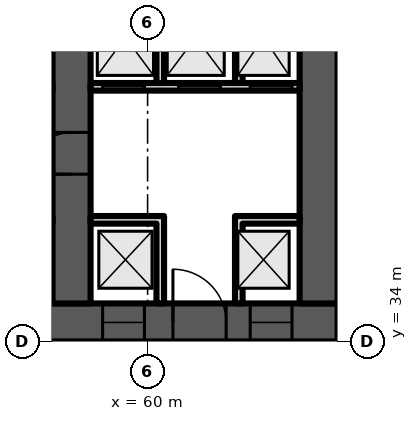
"""IFC4 building model, lengths in metres.
Left out: names, types, materials, properties, quantities, classifications, styles, units other than length and angle.
Written with IfcOpenShell. Run it as: python <this file> out.ifc"""

import sys

from ifc_helpers import new_model, si_unit, direction, frame, frame_2d, origin, place, context, subcontext, project, spatial, polyline, rectangle, outline, extrude, element, fill, save


model = new_model("IFC4")
c1 = context("Model", 3, precision=1e-05, world=origin(), true_north=direction((0.0, 1.0)))
c2 = subcontext(c1, "Body", "Model", "MODEL_VIEW")
j1 = project(units=[si_unit("LENGTHUNIT", "METRE"), si_unit("PLANEANGLEUNIT", "RADIAN")], contexts=[c1])
p1 = place(None, origin())
s1 = spatial("IfcSite", under=j1, at=p1, CompositionType="ELEMENT")
p2 = place(p1, origin())
s2 = spatial("IfcBuilding", under=s1, at=p2, CompositionType="ELEMENT")
p3 = place(p2, frame((0.0, 0.0, 121.9)))
s3 = spatial("IfcBuildingStorey", under=s2, at=p3, CompositionType="ELEMENT", Elevation=121.9)
p4 = place(p3, frame((16.0, 34.5, 0.0), z_axis=(0.0, 0.0, 1.0), x_axis=(1.0, 0.0, 0.0)))
e1 = element("IfcWall", 1, at=p4, inside=s3, PredefinedType="SHEAR", context=c2, shape_type="SweptSolid", body=[
    extrude(rectangle(XDim=49.0, YDim=1.0, at=frame_2d((24.5, 0.0))), origin(), (0.0, 0.0, 1.0), 3.6),
])
p5 = place(p4, frame((1.2, 0.0, 0.0)))
e2 = element("IfcOpeningElement", 2, at=p5, cuts=e1, PredefinedType="OPENING", context=c2, shape_type="SweptSolid", body=[
    extrude(rectangle(XDim=1.1, YDim=2.1, at=frame_2d((0.55, 1.05))), frame((0.0, 0.51, 0.0), z_axis=(0.0, -1.0, 0.0), x_axis=(1.0, 0.0, 0.0)), (0.0, 0.0, 1.0), 1.02),
])
p6 = place(p4, frame((5.083, 0.0, 0.0)))
e3 = element("IfcOpeningElement", 3, at=p6, cuts=e1, PredefinedType="OPENING", context=c2, shape_type="SweptSolid", body=[
    extrude(rectangle(XDim=1.1, YDim=2.1, at=frame_2d((0.55, 1.05))), frame((0.0, 0.51, 0.0), z_axis=(0.0, -1.0, 0.0), x_axis=(1.0, 0.0, 0.0)), (0.0, 0.0, 1.0), 1.02),
])
p7 = place(p4, frame((2.933, 0.0, 0.0)))
e4 = element("IfcOpeningElement", 4, at=p7, cuts=e1, PredefinedType="OPENING", context=c2, shape_type="SweptSolid", body=[
    extrude(rectangle(XDim=1.4, YDim=2.1, at=frame_2d((0.7, 1.05))), frame((0.0, 0.51, 0.0), z_axis=(0.0, -1.0, 0.0), x_axis=(1.0, 0.0, 0.0)), (0.0, 0.0, 1.0), 1.02),
])
p8 = place(p4, frame((7.65, 0.0, 0.0)))
e5 = element("IfcOpeningElement", 5, at=p8, cuts=e1, PredefinedType="OPENING", context=c2, shape_type="SweptSolid", body=[
    extrude(rectangle(XDim=1.2, YDim=2.1, at=frame_2d((0.6, 1.05))), frame((0.0, 0.51, 0.0), z_axis=(0.0, -1.0, 0.0), x_axis=(1.0, 0.0, 0.0)), (0.0, 0.0, 1.0), 1.02),
])
p9 = place(p4, frame((14.817, 0.0, 0.0)))
e6 = element("IfcOpeningElement", 6, at=p9, cuts=e1, PredefinedType="OPENING", context=c2, shape_type="SweptSolid", body=[
    extrude(rectangle(XDim=1.1, YDim=2.1, at=frame_2d((0.55, 1.05))), frame((0.0, 0.51, 0.0), z_axis=(0.0, -1.0, 0.0), x_axis=(1.0, 0.0, 0.0)), (0.0, 0.0, 1.0), 1.02),
])
p10 = place(p4, frame((19.083, 0.0, 0.0)))
e7 = element("IfcOpeningElement", 7, at=p10, cuts=e1, PredefinedType="OPENING", context=c2, shape_type="SweptSolid", body=[
    extrude(rectangle(XDim=1.1, YDim=2.1, at=frame_2d((0.55, 1.05))), frame((0.0, 0.51, 0.0), z_axis=(0.0, -1.0, 0.0), x_axis=(1.0, 0.0, 0.0)), (0.0, 0.0, 1.0), 1.02),
])
p11 = place(p4, frame((16.8, 0.0, 0.0)))
e8 = element("IfcOpeningElement", 8, at=p11, cuts=e1, PredefinedType="OPENING", context=c2, shape_type="SweptSolid", body=[
    extrude(rectangle(XDim=1.4, YDim=2.1, at=frame_2d((0.7, 1.05))), frame((0.0, 0.51, 0.0), z_axis=(0.0, -1.0, 0.0), x_axis=(1.0, 0.0, 0.0)), (0.0, 0.0, 1.0), 1.02),
])
p12 = place(p4, frame((21.817, 0.0, 0.0)))
e9 = element("IfcOpeningElement", 9, at=p12, cuts=e1, PredefinedType="OPENING", context=c2, shape_type="SweptSolid", body=[
    extrude(rectangle(XDim=1.1, YDim=2.1, at=frame_2d((0.55, 1.05))), frame((0.0, 0.51, 0.0), z_axis=(0.0, -1.0, 0.0), x_axis=(1.0, 0.0, 0.0)), (0.0, 0.0, 1.0), 1.02),
])
p13 = place(p4, frame((26.083, 0.0, 0.0)))
e10 = element("IfcOpeningElement", 10, at=p13, cuts=e1, PredefinedType="OPENING", context=c2, shape_type="SweptSolid", body=[
    extrude(rectangle(XDim=1.1, YDim=2.1, at=frame_2d((0.55, 1.05))), frame((0.0, 0.51, 0.0), z_axis=(0.0, -1.0, 0.0), x_axis=(1.0, 0.0, 0.0)), (0.0, 0.0, 1.0), 1.02),
])
p14 = place(p4, frame((33.15, 0.0, 0.0)))
e11 = element("IfcOpeningElement", 11, at=p14, cuts=e1, PredefinedType="OPENING", context=c2, shape_type="SweptSolid", body=[
    extrude(rectangle(XDim=1.2, YDim=2.1, at=frame_2d((0.6, 1.05))), frame((0.0, 0.51, 0.0), z_axis=(0.0, -1.0, 0.0), x_axis=(1.0, 0.0, 0.0)), (0.0, 0.0, 1.0), 1.02),
])
p15 = place(p4, frame((37.8, 0.0, 0.0)))
e12 = element("IfcOpeningElement", 12, at=p15, cuts=e1, PredefinedType="OPENING", context=c2, shape_type="SweptSolid", body=[
    extrude(rectangle(XDim=1.4, YDim=2.1, at=frame_2d((0.7, 1.05))), frame((0.0, 0.51, 0.0), z_axis=(0.0, -1.0, 0.0), x_axis=(1.0, 0.0, 0.0)), (0.0, 0.0, 1.0), 1.02),
])
p16 = place(p4, frame((42.817, 0.0, 0.0)))
e13 = element("IfcOpeningElement", 13, at=p16, cuts=e1, PredefinedType="OPENING", context=c2, shape_type="SweptSolid", body=[
    extrude(rectangle(XDim=1.1, YDim=2.1, at=frame_2d((0.55, 1.05))), frame((0.0, 0.51, 0.0), z_axis=(0.0, -1.0, 0.0), x_axis=(1.0, 0.0, 0.0)), (0.0, 0.0, 1.0), 1.02),
])
p17 = place(p4, frame((46.7, 0.0, 0.0)))
e14 = element("IfcOpeningElement", 14, at=p17, cuts=e1, PredefinedType="OPENING", context=c2, shape_type="SweptSolid", body=[
    extrude(rectangle(XDim=1.1, YDim=2.1, at=frame_2d((0.55, 1.05))), frame((0.0, 0.51, 0.0), z_axis=(0.0, -1.0, 0.0), x_axis=(1.0, 0.0, 0.0)), (0.0, 0.0, 1.0), 1.02),
])
p18 = place(p4, frame((44.667, 0.0, 0.0)))
e15 = element("IfcOpeningElement", 15, at=p18, cuts=e1, PredefinedType="OPENING", context=c2, shape_type="SweptSolid", body=[
    extrude(rectangle(XDim=1.4, YDim=2.1, at=frame_2d((0.7, 1.05))), frame((0.0, 0.51, 0.0), z_axis=(0.0, -1.0, 0.0), x_axis=(1.0, 0.0, 0.0)), (0.0, 0.0, 1.0), 1.02),
])
p19 = place(p3, frame((58.0, 35.0, 0.0), z_axis=(0.0, 0.0, 1.0), x_axis=(0.0, 1.0, 0.0)))
e16 = element("IfcWall", 16, at=p19, inside=s3, PredefinedType="SHEAR", context=c2, shape_type="SweptSolid", body=[
    extrude(rectangle(XDim=13.352, YDim=1.0, at=frame_2d((6.676, 0.0))), origin(), (0.0, 0.0, 1.0), 3.6),
])
p20 = place(p19, frame((10.426, 0.0, 0.0)))
e17 = element("IfcOpeningElement", 17, at=p20, cuts=e16, PredefinedType="OPENING", context=c2, shape_type="SweptSolid", body=[
    extrude(rectangle(XDim=1.0, YDim=2.1, at=frame_2d((0.5, 1.05))), frame((0.0, 0.51, 0.0), z_axis=(0.0, -1.0, 0.0), x_axis=(1.0, 0.0, 0.0)), (0.0, 0.0, 1.0), 1.02),
])
p21 = place(p19, frame((3.4, 0.0, 0.0)))
e18 = element("IfcOpeningElement", 18, at=p21, cuts=e16, PredefinedType="OPENING", context=c2, shape_type="SweptSolid", body=[
    extrude(rectangle(XDim=1.1, YDim=2.1, at=frame_2d((0.55, 1.05))), frame((0.0, 0.51, 0.0), z_axis=(0.0, -1.0, 0.0), x_axis=(1.0, 0.0, 0.0)), (0.0, 0.0, 1.0), 1.02),
])
p22 = place(p3, frame((64.5, 35.0, 0.0), z_axis=(0.0, 0.0, 1.0), x_axis=(0.0, 1.0, 0.0)))
e19 = element("IfcWall", 19, at=p22, inside=s3, PredefinedType="SHEAR", context=c2, shape_type="SweptSolid", body=[
    extrude(rectangle(XDim=12.784, YDim=1.0, at=frame_2d((6.392, 0.0))), origin(), (0.0, 0.0, 1.0), 3.6),
])
p23 = place(p3, frame((58.5, 40.7, 0.0), z_axis=(0.0, 0.0, 1.0), x_axis=(1.0, 0.0, 0.0)))
e20 = element("IfcWall", 20, at=p23, inside=s3, PredefinedType="PARTITIONING", context=c2, shape_type="SweptSolid", body=[
    extrude(rectangle(XDim=5.5, YDim=0.2, at=frame_2d((2.75, 0.0))), origin(), (0.0, 0.0, 1.0), 3.2),
])
p24 = place(p23, frame((0.317, 0.0, 0.0)))
e21 = element("IfcOpeningElement", 21, at=p24, cuts=e20, PredefinedType="OPENING", context=c2, shape_type="SweptSolid", body=[
    extrude(rectangle(XDim=1.1, YDim=2.1, at=frame_2d((0.55, 1.05))), frame((0.0, 0.11, 0.0), z_axis=(0.0, -1.0, 0.0), x_axis=(1.0, 0.0, 0.0)), (0.0, 0.0, 1.0), 0.22),
])
p25 = place(p23, frame((2.317, 0.0, 0.0)))
e22 = element("IfcOpeningElement", 22, at=p25, cuts=e20, PredefinedType="OPENING", context=c2, shape_type="SweptSolid", body=[
    extrude(rectangle(XDim=1.1, YDim=2.1, at=frame_2d((0.55, 1.05))), frame((0.0, 0.11, 0.0), z_axis=(0.0, -1.0, 0.0), x_axis=(1.0, 0.0, 0.0)), (0.0, 0.0, 1.0), 0.22),
])
p26 = place(p23, frame((4.2, 0.0, 0.0)))
e23 = element("IfcOpeningElement", 23, at=p26, cuts=e20, PredefinedType="OPENING", context=c2, shape_type="SweptSolid", body=[
    extrude(rectangle(XDim=1.1, YDim=2.1, at=frame_2d((0.55, 1.05))), frame((0.0, 0.11, 0.0), z_axis=(0.0, -1.0, 0.0), x_axis=(1.0, 0.0, 0.0)), (0.0, 0.0, 1.0), 0.22),
])
p27 = place(p3, origin())
e24 = element("IfcWall", 24, at=p27, inside=s3, PredefinedType="PARTITIONING", context=c2, shape_type="SweptSolid", body=[
    extrude(outline(polyline([(60.233, 37.1), (58.5, 37.1), (58.5, 37.3), (60.233, 37.3), (60.433, 37.3), (60.433, 35.0), (60.233, 35.0), (60.233, 37.1)])), origin(), (0.0, 0.0, 1.0), 3.2),
])
p28 = place(p3, origin())
e25 = element("IfcWall", 25, at=p28, inside=s3, PredefinedType="PARTITIONING", context=c2, shape_type="SweptSolid", body=[
    extrude(outline(polyline([(62.3, 37.3), (62.5, 37.3), (64.0, 37.3), (64.0, 37.1), (62.5, 37.1), (62.5, 35.0), (62.3, 35.0), (62.3, 37.3)])), origin(), (0.0, 0.0, 1.0), 3.2),
])
p29 = place(p3, origin())
e26 = element("IfcWall", 26, at=p29, inside=s3, PredefinedType="PARTITIONING", context=c2, shape_type="SweptSolid", body=[
    extrude(outline(polyline([(60.433, 40.8), (60.233, 40.8), (60.233, 43.8), (58.5, 43.8), (58.5, 44.0), (64.0, 44.0), (64.0, 43.8), (62.5, 43.8), (62.5, 40.8), (62.3, 40.8), (62.3, 43.8), (60.433, 43.8), (60.433, 40.8)])), origin(), (0.0, 0.0, 1.0), 3.2),
])
p30 = place(p16, origin())
e27 = element("IfcDoor", 27, at=p30, inside=s3, OperationType="DOUBLE_DOOR_SLIDING", PredefinedType="DOOR", context=c2, shape_type="SweptSolid", body=[
    extrude(rectangle(XDim=1.1, YDim=2.1, at=frame_2d((0.55, 1.05))), frame((0.0, 0.025, 0.0), z_axis=(0.0, -1.0, 0.0), x_axis=(1.0, 0.0, 0.0)), (0.0, 0.0, 1.0), 0.05),
])
fill(e13, e27)
p31 = place(p17, origin())
e28 = element("IfcDoor", 28, at=p31, inside=s3, OperationType="DOUBLE_DOOR_SLIDING", PredefinedType="DOOR", context=c2, shape_type="SweptSolid", body=[
    extrude(rectangle(XDim=1.1, YDim=2.1, at=frame_2d((0.55, 1.05))), frame((0.0, 0.025, 0.0), z_axis=(0.0, -1.0, 0.0), x_axis=(1.0, 0.0, 0.0)), (0.0, 0.0, 1.0), 0.05),
])
fill(e14, e28)
p32 = place(p18, origin())
e29 = element("IfcDoor", 29, at=p32, inside=s3, OperationType="DOUBLE_DOOR_SINGLE_SWING", PredefinedType="DOOR", context=c2, shape_type="SweptSolid", body=[
    extrude(rectangle(XDim=1.4, YDim=2.1, at=frame_2d((0.7, 1.05))), frame((0.0, 0.025, 0.0), z_axis=(0.0, -1.0, 0.0), x_axis=(1.0, 0.0, 0.0)), (0.0, 0.0, 1.0), 0.05),
])
fill(e15, e29)
p33 = place(p24, origin())
e30 = element("IfcDoor", 30, at=p33, inside=s3, OperationType="DOUBLE_DOOR_SLIDING", PredefinedType="DOOR", context=c2, shape_type="SweptSolid", body=[
    extrude(rectangle(XDim=1.1, YDim=2.1, at=frame_2d((0.55, 1.05))), frame((0.0, 0.025, 0.0), z_axis=(0.0, -1.0, 0.0), x_axis=(1.0, 0.0, 0.0)), (0.0, 0.0, 1.0), 0.05),
])
fill(e21, e30)
p34 = place(p25, origin())
e31 = element("IfcDoor", 31, at=p34, inside=s3, OperationType="DOUBLE_DOOR_SLIDING", PredefinedType="DOOR", context=c2, shape_type="SweptSolid", body=[
    extrude(rectangle(XDim=1.1, YDim=2.1, at=frame_2d((0.55, 1.05))), frame((0.0, 0.025, 0.0), z_axis=(0.0, -1.0, 0.0), x_axis=(1.0, 0.0, 0.0)), (0.0, 0.0, 1.0), 0.05),
])
fill(e22, e31)
p35 = place(p26, origin())
e32 = element("IfcDoor", 32, at=p35, inside=s3, OperationType="DOUBLE_DOOR_SLIDING", PredefinedType="DOOR", context=c2, shape_type="SweptSolid", body=[
    extrude(rectangle(XDim=1.1, YDim=2.1, at=frame_2d((0.55, 1.05))), frame((0.0, 0.025, 0.0), z_axis=(0.0, -1.0, 0.0), x_axis=(1.0, 0.0, 0.0)), (0.0, 0.0, 1.0), 0.05),
])
fill(e23, e32)
p36 = place(p21, origin())
e33 = element("IfcDoor", 33, at=p36, inside=s3, OperationType="SINGLE_SWING_LEFT", PredefinedType="DOOR", context=c2, shape_type="SweptSolid", body=[
    extrude(rectangle(XDim=1.1, YDim=2.1, at=frame_2d((0.55, 1.05))), frame((0.0, 0.025, 0.0), z_axis=(0.0, -1.0, 0.0), x_axis=(1.0, 0.0, 0.0)), (0.0, 0.0, 1.0), 0.05),
])
fill(e18, e33)
save(model, sys.argv[1])
